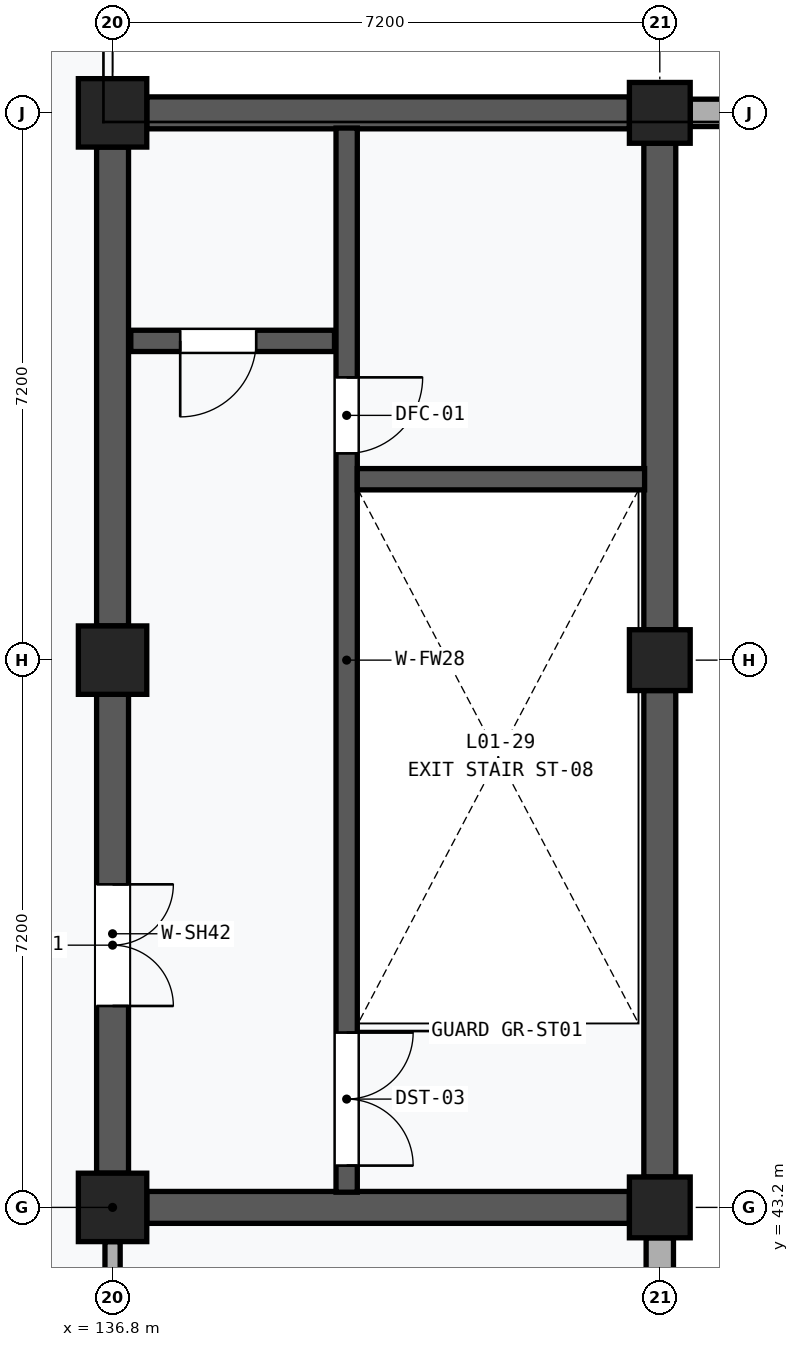
"""IFC4 building model, lengths in metres.
Left out: names, types, materials, properties, quantities, classifications, styles, units other than length and angle.
Written with IfcOpenShell. Run it as: python <this file> out.ifc"""

import sys

from ifc_helpers import new_model, si_unit, direction, frame, frame_2d, origin, origin_2d, place, context, subcontext, project, spatial, rectangle, extrude, element, fill, save


model = new_model("IFC4")
c1 = context("Model", 3, precision=1e-05, world=origin(), true_north=direction((0.0, 1.0)))
c2 = subcontext(c1, "Body", "Model", "MODEL_VIEW")
j1 = project(units=[si_unit("LENGTHUNIT", "METRE"), si_unit("PLANEANGLEUNIT", "RADIAN")], contexts=[c1])
p1 = place(None, origin())
s1 = spatial("IfcSite", under=j1, at=p1, CompositionType="ELEMENT")
p2 = place(p1, origin())
s2 = spatial("IfcBuilding", under=s1, at=p2, CompositionType="ELEMENT")
p3 = place(p2, frame((0.0, 0.0, 4.8)))
s3 = spatial("IfcBuildingStorey", under=s2, at=p3, CompositionType="ELEMENT", Elevation=4.8)
for number, where, z_axis, x_axis in (
    (1, (136.8, 43.2, 0.0), (0.0, 0.0, 1.0), (1.0, 0.0, 0.0)),
    (2, (136.8, 50.4, 0.0), (0.0, 0.0, 1.0), (1.0, 0.0, 0.0)),
    (3, (136.8, 57.6, 0.0), (0.0, 0.0, 1.0), (1.0, 0.0, 0.0)),
):
    element("IfcColumn", number, at=place(p3, frame(where, z_axis=z_axis, x_axis=x_axis)), inside=s3, PredefinedType="COLUMN", context=c2, shape_type="SweptSolid", body=[
        extrude(rectangle(XDim=0.9, YDim=0.9, at=origin_2d()), origin(), (0.0, 0.0, 1.0), 4.8),
    ])
for number, where, z_axis, x_axis in (
    (4, (144.0, 43.2, 0.0), (0.0, 0.0, 1.0), (1.0, 0.0, 0.0)),
    (5, (144.0, 50.4, 0.0), (0.0, 0.0, 1.0), (1.0, 0.0, 0.0)),
    (6, (144.0, 57.6, 0.0), (0.0, 0.0, 1.0), (1.0, 0.0, 0.0)),
):
    element("IfcColumn", number, at=place(p3, frame(where, z_axis=z_axis, x_axis=x_axis)), inside=s3, PredefinedType="COLUMN", context=c2, shape_type="SweptSolid", body=[
        extrude(rectangle(XDim=0.8, YDim=0.8, at=origin_2d()), origin(), (0.0, 0.0, 1.0), 4.8),
    ])
p4 = place(p3, frame((144.0, 36.375, 0.0), z_axis=(0.0, 0.0, 1.0), x_axis=(0.0, 1.0, 0.0)))
e7 = element("IfcWall", 7, at=p4, inside=s3, PredefinedType="SOLIDWALL", context=c2, shape_type="SweptSolid", body=[
    extrude(rectangle(XDim=6.425, YDim=0.36, at=frame_2d((3.212, 0.0))), origin(), (0.0, 0.0, 1.0), 3.85),
])
p5 = place(p4, frame((1.812, 0.0, 0.9)))
e8 = element("IfcOpeningElement", 8, at=p5, cuts=e7, PredefinedType="OPENING", context=c2, shape_type="SweptSolid", body=[
    extrude(rectangle(XDim=2.8, YDim=1.8, at=frame_2d((1.4, 0.9))), frame((0.0, 0.192, 0.0), z_axis=(0.0, -1.0, 0.0), x_axis=(1.0, 0.0, 0.0)), (0.0, 0.0, 1.0), 0.384),
])
p6 = place(p3, frame((144.4, 57.6, 0.0), z_axis=(0.0, 0.0, 1.0), x_axis=(1.0, 0.0, 0.0)))
e9 = element("IfcWall", 9, at=p6, inside=s3, PredefinedType="SOLIDWALL", context=c2, shape_type="SweptSolid", body=[
    extrude(rectangle(XDim=6.4, YDim=0.36, at=frame_2d((3.2, 0.0))), origin(), (0.0, 0.0, 1.0), 3.85),
])
p7 = place(p6, frame((1.5, 0.0, 0.9)))
e10 = element("IfcOpeningElement", 10, at=p7, cuts=e9, PredefinedType="OPENING", context=c2, shape_type="SweptSolid", body=[
    extrude(rectangle(XDim=3.4, YDim=1.8, at=frame_2d((1.7, 0.9))), frame((0.0, 0.192, 0.0), z_axis=(0.0, -1.0, 0.0), x_axis=(1.0, 0.0, 0.0)), (0.0, 0.0, 1.0), 0.384),
])
p8 = place(p3, frame((136.8, 43.65, 0.0), z_axis=(0.0, 0.0, 1.0), x_axis=(0.0, 1.0, 0.0)))
e11 = element("IfcWall", 11, at=p8, inside=s3, PredefinedType="SHEAR", context=c2, shape_type="SweptSolid", body=[
    extrude(rectangle(XDim=6.3, YDim=0.42, at=frame_2d((3.15, 0.0))), origin(), (0.0, 0.0, 1.0), 3.58),
])
p9 = place(p8, frame((2.2, 0.0, 0.0)))
e12 = element("IfcOpeningElement", 12, at=p9, cuts=e11, PredefinedType="OPENING", context=c2, shape_type="SweptSolid", body=[
    extrude(rectangle(XDim=1.6, YDim=2.2, at=frame_2d((0.8, 1.1))), frame((0.0, 0.222, 0.0), z_axis=(0.0, -1.0, 0.0), x_axis=(1.0, 0.0, 0.0)), (0.0, 0.0, 1.0), 0.444),
])
p10 = place(p3, frame((136.8, 50.85, 0.0), z_axis=(0.0, 0.0, 1.0), x_axis=(0.0, 1.0, 0.0)))
e13 = element("IfcWall", 13, at=p10, inside=s3, PredefinedType="SHEAR", context=c2, shape_type="SweptSolid", body=[
    extrude(rectangle(XDim=6.3, YDim=0.42, at=frame_2d((3.15, 0.0))), origin(), (0.0, 0.0, 1.0), 3.58),
])
for number, where, z_axis, x_axis in (
    (14, (144.0, 43.6, 0.0), (0.0, 0.0, 1.0), (0.0, 1.0, 0.0)),
    (15, (144.0, 50.8, 0.0), (0.0, 0.0, 1.0), (0.0, 1.0, 0.0)),
):
    element("IfcWall", number, at=place(p3, frame(where, z_axis=z_axis, x_axis=x_axis)), inside=s3, PredefinedType="SHEAR", context=c2, shape_type="SweptSolid", body=[
        extrude(rectangle(XDim=6.4, YDim=0.42, at=frame_2d((3.2, 0.0))), origin(), (0.0, 0.0, 1.0), 3.85),
    ])
for number, where, z_axis, x_axis in (
    (16, (137.25, 43.2, 0.0), (0.0, 0.0, 1.0), (1.0, 0.0, 0.0)),
    (17, (137.25, 57.6, 0.0), (0.0, 0.0, 1.0), (1.0, 0.0, 0.0)),
):
    element("IfcWall", number, at=place(p3, frame(where, z_axis=z_axis, x_axis=x_axis)), inside=s3, PredefinedType="SHEAR", context=c2, shape_type="SweptSolid", body=[
        extrude(rectangle(XDim=6.35, YDim=0.42, at=frame_2d((3.175, 0.0))), origin(), (0.0, 0.0, 1.0), 3.58),
    ])
p11 = place(p3, frame((139.88, 43.4, 0.0), z_axis=(0.0, 0.0, 1.0), x_axis=(0.0, 1.0, 0.0)))
e18 = element("IfcWall", 18, at=p11, inside=s3, PredefinedType="SHEAR", context=c2, shape_type="SweptSolid", body=[
    extrude(rectangle(XDim=14.0, YDim=0.28, at=frame_2d((7.0, 0.0))), origin(), (0.0, 0.0, 1.0), 4.48),
])
p12 = place(p11, frame((0.35, 0.0, 0.0)))
e19 = element("IfcOpeningElement", 19, at=p12, cuts=e18, PredefinedType="OPENING", context=c2, shape_type="SweptSolid", body=[
    extrude(rectangle(XDim=1.75, YDim=2.15, at=frame_2d((0.875, 1.075))), frame((0.0, 0.152, 0.0), z_axis=(0.0, -1.0, 0.0), x_axis=(1.0, 0.0, 0.0)), (0.0, 0.0, 1.0), 0.304),
])
p13 = place(p11, frame((9.72, 0.0, 0.0)))
e20 = element("IfcOpeningElement", 20, at=p13, cuts=e18, PredefinedType="OPENING", context=c2, shape_type="SweptSolid", body=[
    extrude(rectangle(XDim=1.0, YDim=2.15, at=frame_2d((0.5, 1.075))), frame((0.0, 0.152, 0.0), z_axis=(0.0, -1.0, 0.0), x_axis=(1.0, 0.0, 0.0)), (0.0, 0.0, 1.0), 0.304),
])
p14 = place(p3, frame((140.02, 52.78, 0.0), z_axis=(0.0, 0.0, 1.0), x_axis=(1.0, 0.0, 0.0)))
e21 = element("IfcWall", 21, at=p14, inside=s3, PredefinedType="SHEAR", context=c2, shape_type="SweptSolid", body=[
    extrude(rectangle(XDim=3.78, YDim=0.28, at=frame_2d((1.89, 0.0))), origin(), (0.0, 0.0, 1.0), 4.48),
])
p15 = place(p3, frame((137.04, 54.6, 0.0), z_axis=(0.0, 0.0, 1.0), x_axis=(1.0, 0.0, 0.0)))
e22 = element("IfcWall", 22, at=p15, inside=s3, PredefinedType="SHEAR", context=c2, shape_type="SweptSolid", body=[
    extrude(rectangle(XDim=2.68, YDim=0.28, at=frame_2d((1.34, 0.0))), origin(), (0.0, 0.0, 1.0), 4.48),
])
p16 = place(p15, frame((0.65, 0.0, 0.0)))
e23 = element("IfcOpeningElement", 23, at=p16, cuts=e22, PredefinedType="OPENING", context=c2, shape_type="SweptSolid", body=[
    extrude(rectangle(XDim=1.0, YDim=2.15, at=frame_2d((0.5, 1.075))), frame((0.0, 0.152, 0.0), z_axis=(0.0, -1.0, 0.0), x_axis=(1.0, 0.0, 0.0)), (0.0, 0.0, 1.0), 0.304),
])
p17 = place(p3, frame((136.8, 36.45, 0.0), z_axis=(0.0, 0.0, 1.0), x_axis=(0.0, 1.0, 0.0)))
e24 = element("IfcWall", 24, at=p17, inside=s3, PredefinedType="PARTITIONING", context=c2, shape_type="SweptSolid", body=[
    extrude(rectangle(XDim=6.3, YDim=0.2, at=frame_2d((3.15, 0.0))), origin(), (0.0, 0.0, 1.0), 3.58),
])
p18 = place(p9, frame((1.6, 0.0, 0.0), z_axis=(0.0, 0.0, 1.0), x_axis=(-1.0, 0.0, 0.0)))
e25 = element("IfcDoor", 25, at=p18, inside=s3, OperationType="DOUBLE_DOOR_SINGLE_SWING", PredefinedType="DOOR", context=c2, shape_type="SweptSolid", body=[
    extrude(rectangle(XDim=1.6, YDim=2.2, at=frame_2d((0.8, 1.1))), frame((0.0, 0.025, 0.0), z_axis=(0.0, -1.0, 0.0), x_axis=(1.0, 0.0, 0.0)), (0.0, 0.0, 1.0), 0.05),
])
fill(e12, e25)
p19 = place(p12, frame((1.75, 0.0, 0.0), z_axis=(0.0, 0.0, 1.0), x_axis=(-1.0, 0.0, 0.0)))
e26 = element("IfcDoor", 26, at=p19, inside=s3, OperationType="DOUBLE_DOOR_SINGLE_SWING", PredefinedType="DOOR", context=c2, shape_type="SweptSolid", body=[
    extrude(rectangle(XDim=1.75, YDim=2.15, at=frame_2d((0.875, 1.075))), frame((0.0, 0.025, 0.0), z_axis=(0.0, -1.0, 0.0), x_axis=(1.0, 0.0, 0.0)), (0.0, 0.0, 1.0), 0.05),
])
fill(e19, e26)
p20 = place(p13, frame((1.0, 0.0, 0.0), z_axis=(0.0, 0.0, 1.0), x_axis=(-1.0, 0.0, 0.0)))
e27 = element("IfcDoor", 27, at=p20, inside=s3, OperationType="SINGLE_SWING_LEFT", PredefinedType="DOOR", context=c2, shape_type="SweptSolid", body=[
    extrude(rectangle(XDim=1.0, YDim=2.15, at=frame_2d((0.5, 1.075))), frame((0.0, 0.025, 0.0), z_axis=(0.0, -1.0, 0.0), x_axis=(1.0, 0.0, 0.0)), (0.0, 0.0, 1.0), 0.05),
])
fill(e20, e27)
p21 = place(p16, frame((1.0, 0.0, 0.0), z_axis=(0.0, 0.0, 1.0), x_axis=(-1.0, 0.0, 0.0)))
e28 = element("IfcDoor", 28, at=p21, inside=s3, OperationType="SINGLE_SWING_RIGHT", PredefinedType="DOOR", context=c2, shape_type="SweptSolid", body=[
    extrude(rectangle(XDim=1.0, YDim=2.15, at=frame_2d((0.5, 1.075))), frame((0.0, 0.025, 0.0), z_axis=(0.0, -1.0, 0.0), x_axis=(1.0, 0.0, 0.0)), (0.0, 0.0, 1.0), 0.05),
])
fill(e23, e28)
save(model, sys.argv[1])
